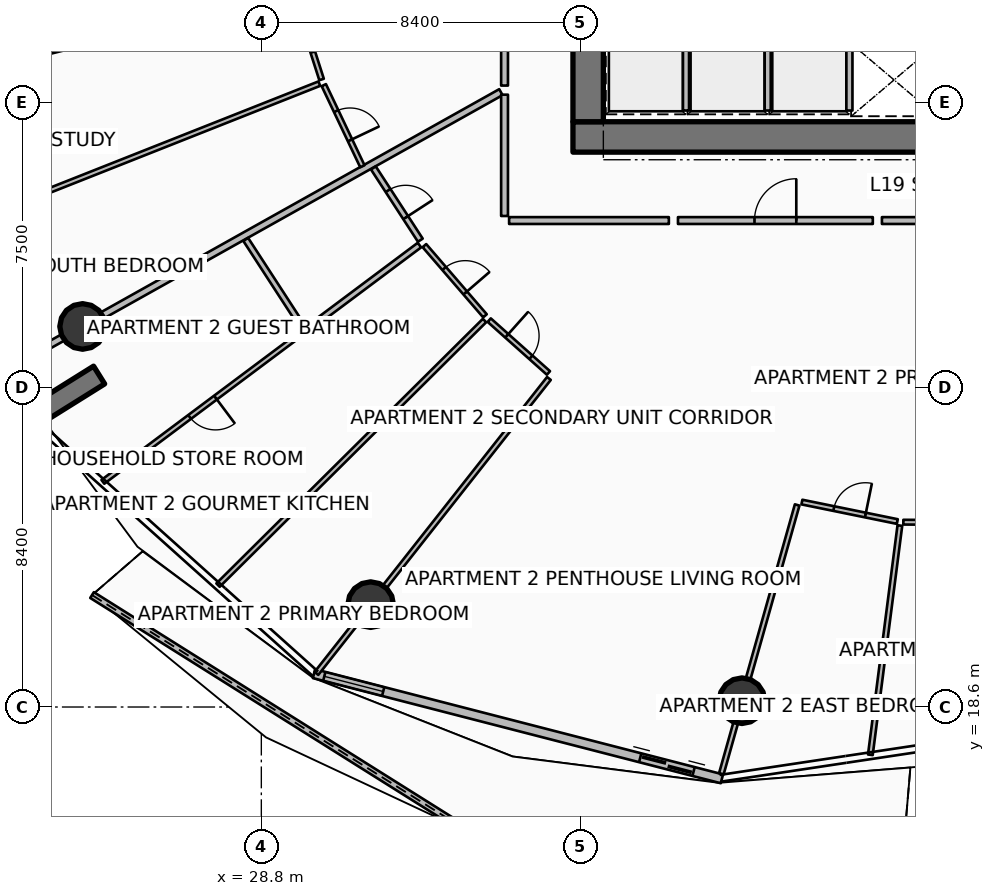
"""IFC4 building model, lengths in metres.
Left out: names, types, materials, properties, quantities, classifications, styles, units other than length and angle.
Written with IfcOpenShell. Run it as: python <this file> out.ifc"""

import sys

from ifc_helpers import new_model, si_unit, direction, frame, frame_2d, origin, origin_2d, place, context, subcontext, project, spatial, polyline, rectangle, circle, outline, extrude, element, fill, save


model = new_model("IFC4")
c1 = context("Model", 3, precision=1e-05, world=origin(), true_north=direction((0.0, 1.0)))
c2 = subcontext(c1, "Body", "Model", "MODEL_VIEW")
j1 = project(units=[si_unit("LENGTHUNIT", "METRE"), si_unit("PLANEANGLEUNIT", "RADIAN")], contexts=[c1])
p1 = place(None, origin())
s1 = spatial("IfcSite", under=j1, at=p1, CompositionType="ELEMENT")
p2 = place(p1, origin())
s2 = spatial("IfcBuilding", under=s1, at=p2, CompositionType="ELEMENT")
p3 = place(p2, frame((0.0, 0.0, 78.9)))
s3 = spatial("IfcBuildingStorey", under=s2, at=p3, CompositionType="ELEMENT", Elevation=78.9)
p4 = place(p3, frame((37.0, 33.6, 0.0), z_axis=(0.0, 0.0, 1.0), x_axis=(1.0, 0.0, 0.0)))
e1 = element("IfcWall", 1, at=p4, inside=s3, PredefinedType="SHEAR", context=c2, shape_type="SweptSolid", body=[
    extrude(rectangle(XDim=9.9, YDim=0.8, at=frame_2d((4.95, 0.0))), origin(), (0.0, 0.0, 1.0), 3.75),
])
p5 = place(p3, frame((37.4, 34.0, 0.0), z_axis=(0.0, 0.0, 1.0), x_axis=(0.0, 1.0, 0.0)))
e2 = element("IfcWall", 2, at=p5, inside=s3, PredefinedType="SHEAR", context=c2, shape_type="SweptSolid", body=[
    extrude(rectangle(XDim=16.0, YDim=0.8, at=frame_2d((8.0, 0.0))), origin(), (0.0, 0.0, 1.0), 3.75),
])
p6 = place(p3, frame((24.531, 27.335, 0.0), z_axis=(0.0, 0.0, 1.0), x_axis=(-0.848053161125, -0.529911158502, 0.0)))
e3 = element("IfcWall", 3, at=p6, inside=s3, PredefinedType="SOLIDWALL", context=c2, shape_type="SweptSolid", body=[
    extrude(rectangle(XDim=3.5, YDim=0.55, at=frame_2d((1.75, 0.0))), origin(), (0.0, 0.0, 1.0), 3.75),
])
for number, where, z_axis, x_axis in (
    (4, (24.097, 28.614, 0.0), (0.0, 0.0, 1.0), (1.0, 0.0, 0.0)),
    (5, (31.677, 21.294, 0.0), (0.0, 0.0, 1.0), (1.0, 0.0, 0.0)),
    (6, (41.447, 18.766, 0.0), (0.0, 0.0, 1.0), (1.0, 0.0, 0.0)),
):
    element("IfcColumn", number, at=place(p3, frame(where, z_axis=z_axis, x_axis=x_axis)), inside=s3, PredefinedType="COLUMN", context=c2, shape_type="SweptSolid", body=[
        extrude(circle(Radius=0.6, at=origin_2d()), origin(), (0.0, 0.0, 1.0), 3.5),
    ])
p7 = place(p3, frame((24.345, 21.546, 0.0), z_axis=(0.0, 0.0, 1.0), x_axis=(0.846860965628, -0.531814351908, 0.0)))
e7 = element("IfcWall", 7, at=p7, inside=s3, PredefinedType="PARAPET", context=c2, shape_type="SweptSolid", body=[
    extrude(outline(polyline([(0.0, 0.0), (11.718, 0.0), (11.718, 1.632), (5.859, 1.418), (0.0, 1.233), (0.0, 0.0)])), frame((0.0, 0.09, 0.0), z_axis=(0.0, -1.0, 0.0), x_axis=(1.0, 0.0, 0.0)), (0.0, 0.0, 1.0), 0.18),
])
p8 = place(p3, frame((46.0, 14.436, 0.0), z_axis=(0.0, 0.0, 1.0), x_axis=(0.962322473133, 0.271910753195, 0.0)))
e8 = element("IfcWall", 8, at=p8, inside=s3, PredefinedType="PARAPET", context=c2, shape_type="SweptSolid", body=[
    extrude(outline(polyline([(0.0, 0.0), (10.308, 0.0), (10.308, 1.632), (5.154, 1.798), (0.0, 1.86), (0.0, 0.0)])), frame((0.0, 0.09, 0.0), z_axis=(0.0, -1.0, 0.0), x_axis=(1.0, 0.0, 0.0)), (0.0, 0.0, 1.0), 0.18),
])
p9 = place(p3, frame((30.186, 19.477, 0.0), z_axis=(0.0, 0.0, 1.0), x_axis=(0.968356180858, -0.249572248045, 0.0)))
e9 = element("IfcWall", 9, at=p9, inside=s3, PredefinedType="SOLIDWALL", context=c2, shape_type="SweptSolid", body=[
    extrude(rectangle(XDim=11.084, YDim=0.24, at=frame_2d((5.542, 0.0))), origin(), (0.0, 0.0, 1.0), 2.45),
])
p10 = place(p9, frame((8.865, 0.0, 0.0)))
e10 = element("IfcOpeningElement", 10, at=p10, cuts=e9, PredefinedType="OPENING", context=c2, shape_type="SweptSolid", body=[
    extrude(rectangle(XDim=1.45, YDim=2.15, at=frame_2d((0.725, 1.075))), frame((0.0, 0.13, 0.0), z_axis=(0.0, -1.0, 0.0), x_axis=(1.0, 0.0, 0.0)), (0.0, 0.0, 1.0), 0.26),
])
p11 = place(p9, frame((0.28, 0.0, 0.65)))
e11 = element("IfcOpeningElement", 11, at=p11, cuts=e9, PredefinedType="OPENING", context=c2, shape_type="SweptSolid", body=[
    extrude(rectangle(XDim=1.6, YDim=1.5, at=frame_2d((0.8, 0.75))), frame((0.0, 0.13, 0.0), z_axis=(0.0, -1.0, 0.0), x_axis=(1.0, 0.0, 0.0)), (0.0, 0.0, 1.0), 0.26),
])
for number, where, z_axis, x_axis in (
    (12, (39.975, 34.295, 0.0), (0.0, 0.0, 1.0), (0.0, 1.0, 0.0)),
    (13, (42.125, 34.295, 0.0), (0.0, 0.0, 1.0), (0.0, 1.0, 0.0)),
    (14, (44.275, 34.295, 0.0), (0.0, 0.0, 1.0), (0.0, 1.0, 0.0)),
):
    element("IfcWall", number, at=place(p3, frame(where, z_axis=z_axis, x_axis=x_axis)), inside=s3, PredefinedType="PARTITIONING", context=c2, shape_type="SweptSolid", body=[
        extrude(rectangle(XDim=1.61, YDim=0.16, at=frame_2d((0.805, 0.0))), origin(), (0.0, 0.0, 1.0), 3.5),
    ])
p12 = place(p3, frame((35.104, 34.778, 0.0), z_axis=(0.0, 0.0, 1.0), x_axis=(-0.872490437896, -0.488631185845, 0.0)))
e15 = element("IfcWall", 15, at=p12, inside=s3, PredefinedType="PARTITIONING", context=c2, shape_type="SweptSolid", body=[
    extrude(rectangle(XDim=14.699, YDim=0.18, at=frame_2d((7.35, 0.0))), origin(), (0.0, 0.0, 1.0), 2.94),
])
p13 = place(p3, frame((35.2, 40.365, 0.0), z_axis=(0.0, 0.0, 1.0), x_axis=(0.0, -1.0, 0.0)))
e16 = element("IfcWall", 16, at=p13, inside=s3, PredefinedType="PARTITIONING", context=c2, shape_type="SweptSolid", body=[
    extrude(rectangle(XDim=5.413, YDim=0.18, at=frame_2d((2.707, 0.0))), origin(), (0.0, 0.0, 1.0), 2.94),
])
p14 = place(p3, frame((29.552, 37.417, 0.0), z_axis=(0.0, 0.0, 1.0), x_axis=(-0.970504192203, -0.241084244437, 0.0)))
e17 = element("IfcWall", 17, at=p14, inside=s3, PredefinedType="PARTITIONING", context=c2, shape_type="SweptSolid", body=[
    extrude(rectangle(XDim=9.976, YDim=0.125, at=frame_2d((4.988, 0.0))), origin(), (0.0, 0.0, 1.0), 2.94),
])
p15 = place(p3, frame((30.326, 35.002, 0.0), z_axis=(0.0, 0.0, 1.0), x_axis=(-0.929777602375, -0.368121732748, 0.0)))
e18 = element("IfcWall", 18, at=p15, inside=s3, PredefinedType="PARTITIONING", context=c2, shape_type="SweptSolid", body=[
    extrude(rectangle(XDim=9.961, YDim=0.125, at=frame_2d((4.98, 0.0))), origin(), (0.0, 0.0, 1.0), 2.94),
])
p16 = place(p3, frame((29.663, 37.363, 0.0), z_axis=(0.0, 0.0, 1.0), x_axis=(0.305393983716, -0.952226083822, 0.0)))
e19 = element("IfcWall", 19, at=p16, inside=s3, PredefinedType="PARTITIONING", context=c2, shape_type="SweptSolid", body=[
    extrude(rectangle(XDim=2.364, YDim=0.125, at=frame_2d((1.182, 0.0))), origin(), (0.0, 0.0, 1.0), 2.94),
])
p17 = place(p16, frame((0.757, 0.0, 0.0)))
e20 = element("IfcOpeningElement", 20, at=p17, cuts=e19, PredefinedType="OPENING", context=c2, shape_type="SweptSolid", body=[
    extrude(rectangle(XDim=0.85, YDim=2.06, at=frame_2d((0.425, 1.03))), frame((0.0, 0.073, 0.0), z_axis=(0.0, -1.0, 0.0), x_axis=(1.0, 0.0, 0.0)), (0.0, 0.0, 1.0), 0.145),
])
p18 = place(p3, frame((30.444, 34.963, 0.0), z_axis=(0.0, 0.0, 1.0), x_axis=(0.429404357622, -0.903112339443, 0.0)))
e21 = element("IfcWall", 21, at=p18, inside=s3, PredefinedType="PARTITIONING", context=c2, shape_type="SweptSolid", body=[
    extrude(rectangle(XDim=2.364, YDim=0.125, at=frame_2d((1.182, 0.0))), origin(), (0.0, 0.0, 1.0), 2.94),
])
p19 = place(p18, frame((0.757, 0.0, 0.0)))
e22 = element("IfcOpeningElement", 22, at=p19, cuts=e21, PredefinedType="OPENING", context=c2, shape_type="SweptSolid", body=[
    extrude(rectangle(XDim=0.85, YDim=2.06, at=frame_2d((0.425, 1.03))), frame((0.0, 0.073, 0.0), z_axis=(0.0, -1.0, 0.0), x_axis=(1.0, 0.0, 0.0)), (0.0, 0.0, 1.0), 0.145),
])
p20 = place(p3, frame((39.764, 31.4, 0.0), z_axis=(0.0, 0.0, 1.0), x_axis=(1.0, 0.0, 0.0)))
e23 = element("IfcWall", 23, at=p20, inside=s3, PredefinedType="PARTITIONING", context=c2, shape_type="SweptSolid", body=[
    extrude(rectangle(XDim=5.127, YDim=0.18, at=frame_2d((2.563, 0.0))), origin(), (0.0, 0.0, 1.0), 2.94),
])
p21 = place(p20, frame((2.013, 0.0, 0.0)))
e24 = element("IfcOpeningElement", 24, at=p21, cuts=e23, PredefinedType="OPENING", context=c2, shape_type="SweptSolid", body=[
    extrude(rectangle(XDim=1.1, YDim=2.1, at=frame_2d((0.55, 1.05))), frame((0.0, 0.1, 0.0), z_axis=(0.0, -1.0, 0.0), x_axis=(1.0, 0.0, 0.0)), (0.0, 0.0, 1.0), 0.2),
])
p22 = place(p3, frame((35.2, 34.712, 0.0), z_axis=(0.0, 0.0, 1.0), x_axis=(0.0, -1.0, 0.0)))
e25 = element("IfcWall", 25, at=p22, inside=s3, PredefinedType="PARTITIONING", context=c2, shape_type="SweptSolid", body=[
    extrude(rectangle(XDim=3.192, YDim=0.18, at=frame_2d((1.596, 0.0))), origin(), (0.0, 0.0, 1.0), 2.94),
])
p23 = place(p3, frame((35.32, 31.4, 0.0), z_axis=(0.0, 0.0, 1.0), x_axis=(1.0, 0.0, 0.0)))
e26 = element("IfcWall", 26, at=p23, inside=s3, PredefinedType="PARTITIONING", context=c2, shape_type="SweptSolid", body=[
    extrude(rectangle(XDim=4.204, YDim=0.18, at=frame_2d((2.102, 0.0))), origin(), (0.0, 0.0, 1.0), 2.94),
])
p24 = place(p3, frame((36.368, 27.245, 0.0), z_axis=(0.0, 0.0, 1.0), x_axis=(-0.619096231027, -0.785315132115, 0.0)))
e27 = element("IfcWall", 27, at=p24, inside=s3, PredefinedType="PARTITIONING", context=c2, shape_type="SweptSolid", body=[
    extrude(rectangle(XDim=9.882, YDim=0.125, at=frame_2d((4.941, 0.0))), origin(), (0.0, 0.0, 1.0), 2.94),
])
p25 = place(p3, frame((31.748, 32.784, 0.0), z_axis=(0.0, 0.0, 1.0), x_axis=(0.544920213423, -0.838487901524, 0.0)))
e28 = element("IfcWall", 28, at=p25, inside=s3, PredefinedType="PARTITIONING", context=c2, shape_type="SweptSolid", body=[
    extrude(rectangle(XDim=2.267, YDim=0.15, at=frame_2d((1.134, 0.0))), origin(), (0.0, 0.0, 1.0), 2.94),
])
p26 = place(p25, frame((0.708, 0.0, 0.0)))
e29 = element("IfcOpeningElement", 29, at=p26, cuts=e28, PredefinedType="OPENING", context=c2, shape_type="SweptSolid", body=[
    extrude(rectangle(XDim=0.85, YDim=2.06, at=frame_2d((0.425, 1.03))), frame((0.0, 0.085, 0.0), z_axis=(0.0, -1.0, 0.0), x_axis=(1.0, 0.0, 0.0)), (0.0, 0.0, 1.0), 0.17),
])
p27 = place(p3, frame((28.389, 30.903, 0.0), z_axis=(0.0, 0.0, 1.0), x_axis=(0.544849096032, -0.838534115318, 0.0)))
e30 = element("IfcWall", 30, at=p27, inside=s3, PredefinedType="PARTITIONING", context=c2, shape_type="SweptSolid", body=[
    extrude(rectangle(XDim=2.773, YDim=0.15, at=frame_2d((1.387, 0.0))), origin(), (0.0, 0.0, 1.0), 2.94),
])
p28 = place(p3, frame((32.961, 30.754, 0.0), z_axis=(0.0, 0.0, 1.0), x_axis=(-0.800889069655, -0.598812740435, 0.0)))
e31 = element("IfcWall", 31, at=p28, inside=s3, PredefinedType="PARTITIONING", context=c2, shape_type="SweptSolid", body=[
    extrude(rectangle(XDim=3.72, YDim=0.15, at=frame_2d((1.86, 0.0))), origin(), (0.0, 0.0, 1.0), 2.94),
])
p29 = place(p3, frame((29.877, 28.448, 0.0), z_axis=(0.0, 0.0, 1.0), x_axis=(-0.800862229892, -0.598848635911, 0.0)))
e32 = element("IfcWall", 32, at=p29, inside=s3, PredefinedType="PARTITIONING", context=c2, shape_type="SweptSolid", body=[
    extrude(rectangle(XDim=6.552, YDim=0.125, at=frame_2d((3.276, 0.0))), origin(), (0.0, 0.0, 1.0), 2.94),
])
p30 = place(p29, frame((2.851, 0.0, 0.0)))
e33 = element("IfcOpeningElement", 33, at=p30, cuts=e32, PredefinedType="OPENING", context=c2, shape_type="SweptSolid", body=[
    extrude(rectangle(XDim=0.85, YDim=2.06, at=frame_2d((0.425, 1.03))), frame((0.0, 0.073, 0.0), z_axis=(0.0, -1.0, 0.0), x_axis=(1.0, 0.0, 0.0)), (0.0, 0.0, 1.0), 0.145),
])
p31 = place(p3, frame((34.673, 28.769, 0.0), z_axis=(0.0, 0.0, 1.0), x_axis=(-0.709671596246, -0.70453262911, 0.0)))
e34 = element("IfcWall", 34, at=p31, inside=s3, PredefinedType="PARTITIONING", context=c2, shape_type="SweptSolid", body=[
    extrude(rectangle(XDim=9.882, YDim=0.125, at=frame_2d((4.941, 0.0))), origin(), (0.0, 0.0, 1.0), 2.94),
])
p32 = place(p3, frame((33.092, 30.74, 0.0), z_axis=(0.0, 0.0, 1.0), x_axis=(0.653244508484, -0.757147021479, 0.0)))
e35 = element("IfcWall", 35, at=p32, inside=s3, PredefinedType="PARTITIONING", context=c2, shape_type="SweptSolid", body=[
    extrude(rectangle(XDim=2.439, YDim=0.125, at=frame_2d((1.219, 0.0))), origin(), (0.0, 0.0, 1.0), 2.94),
])
p33 = place(p32, frame((0.794, 0.0, 0.0)))
e36 = element("IfcOpeningElement", 36, at=p33, cuts=e35, PredefinedType="OPENING", context=c2, shape_type="SweptSolid", body=[
    extrude(rectangle(XDim=0.85, YDim=2.06, at=frame_2d((0.425, 1.03))), frame((0.0, 0.073, 0.0), z_axis=(0.0, -1.0, 0.0), x_axis=(1.0, 0.0, 0.0)), (0.0, 0.0, 1.0), 0.145),
])
p34 = place(p3, frame((34.797, 28.78, 0.0), z_axis=(0.0, 0.0, 1.0), x_axis=(0.74635037564, -0.665553241132, 0.0)))
e37 = element("IfcWall", 37, at=p34, inside=s3, PredefinedType="PARTITIONING", context=c2, shape_type="SweptSolid", body=[
    extrude(rectangle(XDim=2.088, YDim=0.125, at=frame_2d((1.044, 0.0))), origin(), (0.0, 0.0, 1.0), 2.94),
])
p35 = place(p34, frame((0.619, 0.0, 0.0)))
e38 = element("IfcOpeningElement", 38, at=p35, cuts=e37, PredefinedType="OPENING", context=c2, shape_type="SweptSolid", body=[
    extrude(rectangle(XDim=0.85, YDim=2.06, at=frame_2d((0.425, 1.03))), frame((0.0, 0.073, 0.0), z_axis=(0.0, -1.0, 0.0), x_axis=(1.0, 0.0, 0.0)), (0.0, 0.0, 1.0), 0.145),
])
p36 = place(p3, frame((45.131, 31.4, 0.0), z_axis=(0.0, 0.0, 1.0), x_axis=(1.0, 0.0, 0.0)))
e39 = element("IfcWall", 39, at=p36, inside=s3, PredefinedType="PARTITIONING", context=c2, shape_type="SweptSolid", body=[
    extrude(rectangle(XDim=4.004, YDim=0.18, at=frame_2d((2.002, 0.0))), origin(), (0.0, 0.0, 1.0), 2.94),
])
p37 = place(p3, frame((42.9, 23.917, 0.0), z_axis=(0.0, 0.0, 1.0), x_axis=(-0.27145069635, -0.962452346587, 0.0)))
e40 = element("IfcWall", 40, at=p37, inside=s3, PredefinedType="PARTITIONING", context=c2, shape_type="SweptSolid", body=[
    extrude(rectangle(XDim=7.349, YDim=0.125, at=frame_2d((3.674, 0.0))), origin(), (0.0, 0.0, 1.0), 2.94),
])
p38 = place(p3, frame((45.603, 23.375, 0.0), z_axis=(0.0, 0.0, 1.0), x_axis=(-0.127689849516, -0.991814147071, 0.0)))
e41 = element("IfcWall", 41, at=p38, inside=s3, PredefinedType="PARTITIONING", context=c2, shape_type="SweptSolid", body=[
    extrude(rectangle(XDim=6.082, YDim=0.125, at=frame_2d((3.041, 0.0))), origin(), (0.0, 0.0, 1.0), 2.94),
])
p39 = place(p3, frame((43.025, 23.993, 0.0), z_axis=(0.0, 0.0, 1.0), x_axis=(0.97978119615, -0.200072006215, 0.0)))
e42 = element("IfcWall", 42, at=p39, inside=s3, PredefinedType="PARTITIONING", context=c2, shape_type="SweptSolid", body=[
    extrude(rectangle(XDim=2.562, YDim=0.125, at=frame_2d((1.281, 0.0))), origin(), (0.0, 0.0, 1.0), 2.94),
])
p40 = place(p39, frame((0.856, 0.0, 0.0)))
e43 = element("IfcOpeningElement", 43, at=p40, cuts=e42, PredefinedType="OPENING", context=c2, shape_type="SweptSolid", body=[
    extrude(rectangle(XDim=0.85, YDim=2.06, at=frame_2d((0.425, 1.03))), frame((0.0, 0.073, 0.0), z_axis=(0.0, -1.0, 0.0), x_axis=(1.0, 0.0, 0.0)), (0.0, 0.0, 1.0), 0.145),
])
p41 = place(p3, frame((45.694, 23.463, 0.0), z_axis=(0.0, 0.0, 1.0), x_axis=(0.999986986287, -0.005101691496, 0.0)))
e44 = element("IfcWall", 44, at=p41, inside=s3, PredefinedType="PARTITIONING", context=c2, shape_type="SweptSolid", body=[
    extrude(rectangle(XDim=4.403, YDim=0.125, at=frame_2d((2.201, 0.0))), origin(), (0.0, 0.0, 1.0), 2.94),
])
p42 = place(p41, frame((1.751, 0.0, 0.0)))
e45 = element("IfcOpeningElement", 45, at=p42, cuts=e44, PredefinedType="OPENING", context=c2, shape_type="SweptSolid", body=[
    extrude(rectangle(XDim=0.9, YDim=2.08, at=frame_2d((0.45, 1.04))), frame((0.0, 0.073, 0.0), z_axis=(0.0, -1.0, 0.0), x_axis=(1.0, 0.0, 0.0)), (0.0, 0.0, 1.0), 0.145),
])
p43 = place(p10, origin())
e46 = element("IfcDoor", 46, at=p43, inside=s3, OperationType="DOUBLE_DOOR_SLIDING", PredefinedType="DOOR", context=c2, shape_type="SweptSolid", body=[
    extrude(rectangle(XDim=1.45, YDim=2.15, at=frame_2d((0.725, 1.075))), frame((0.0, 0.025, 0.0), z_axis=(0.0, -1.0, 0.0), x_axis=(1.0, 0.0, 0.0)), (0.0, 0.0, 1.0), 0.05),
])
fill(e10, e46)
p44 = place(p11, origin())
e47 = element("IfcWindow", 47, at=p44, inside=s3, PartitioningType="SINGLE_PANEL", PredefinedType="WINDOW", context=c2, shape_type="SweptSolid", body=[
    extrude(rectangle(XDim=1.6, YDim=1.5, at=frame_2d((0.8, 0.75))), frame((0.0, 0.03, 0.0), z_axis=(0.0, -1.0, 0.0), x_axis=(1.0, 0.0, 0.0)), (0.0, 0.0, 1.0), 0.06),
])
fill(e11, e47)
p45 = place(p17, origin())
e48 = element("IfcDoor", 48, at=p45, inside=s3, OperationType="SINGLE_SWING_LEFT", PredefinedType="DOOR", context=c2, shape_type="SweptSolid", body=[
    extrude(rectangle(XDim=0.85, YDim=2.06, at=frame_2d((0.425, 1.03))), frame((0.0, 0.025, 0.0), z_axis=(0.0, -1.0, 0.0), x_axis=(1.0, 0.0, 0.0)), (0.0, 0.0, 1.0), 0.05),
])
fill(e20, e48)
p46 = place(p19, origin())
e49 = element("IfcDoor", 49, at=p46, inside=s3, OperationType="SINGLE_SWING_RIGHT", PredefinedType="DOOR", context=c2, shape_type="SweptSolid", body=[
    extrude(rectangle(XDim=0.85, YDim=2.06, at=frame_2d((0.425, 1.03))), frame((0.0, 0.025, 0.0), z_axis=(0.0, -1.0, 0.0), x_axis=(1.0, 0.0, 0.0)), (0.0, 0.0, 1.0), 0.05),
])
fill(e22, e49)
p47 = place(p21, origin())
e50 = element("IfcDoor", 50, at=p47, inside=s3, OperationType="SINGLE_SWING_RIGHT", PredefinedType="DOOR", context=c2, shape_type="SweptSolid", body=[
    extrude(rectangle(XDim=1.1, YDim=2.1, at=frame_2d((0.55, 1.05))), frame((0.0, 0.025, 0.0), z_axis=(0.0, -1.0, 0.0), x_axis=(1.0, 0.0, 0.0)), (0.0, 0.0, 1.0), 0.05),
])
fill(e24, e50)
p48 = place(p26, origin())
e51 = element("IfcDoor", 51, at=p48, inside=s3, OperationType="SINGLE_SWING_RIGHT", PredefinedType="DOOR", context=c2, shape_type="SweptSolid", body=[
    extrude(rectangle(XDim=0.85, YDim=2.06, at=frame_2d((0.425, 1.03))), frame((0.0, 0.025, 0.0), z_axis=(0.0, -1.0, 0.0), x_axis=(1.0, 0.0, 0.0)), (0.0, 0.0, 1.0), 0.05),
])
fill(e29, e51)
p49 = place(p30, origin())
e52 = element("IfcDoor", 52, at=p49, inside=s3, OperationType="SINGLE_SWING_LEFT", PredefinedType="DOOR", context=c2, shape_type="SweptSolid", body=[
    extrude(rectangle(XDim=0.85, YDim=2.06, at=frame_2d((0.425, 1.03))), frame((0.0, 0.025, 0.0), z_axis=(0.0, -1.0, 0.0), x_axis=(1.0, 0.0, 0.0)), (0.0, 0.0, 1.0), 0.05),
])
fill(e33, e52)
p50 = place(p33, origin())
e53 = element("IfcDoor", 53, at=p50, inside=s3, OperationType="SINGLE_SWING_RIGHT", PredefinedType="DOOR", context=c2, shape_type="SweptSolid", body=[
    extrude(rectangle(XDim=0.85, YDim=2.06, at=frame_2d((0.425, 1.03))), frame((0.0, 0.025, 0.0), z_axis=(0.0, -1.0, 0.0), x_axis=(1.0, 0.0, 0.0)), (0.0, 0.0, 1.0), 0.05),
])
fill(e36, e53)
p51 = place(p35, origin())
e54 = element("IfcDoor", 54, at=p51, inside=s3, OperationType="SINGLE_SWING_LEFT", PredefinedType="DOOR", context=c2, shape_type="SweptSolid", body=[
    extrude(rectangle(XDim=0.85, YDim=2.06, at=frame_2d((0.425, 1.03))), frame((0.0, 0.025, 0.0), z_axis=(0.0, -1.0, 0.0), x_axis=(1.0, 0.0, 0.0)), (0.0, 0.0, 1.0), 0.05),
])
fill(e38, e54)
p52 = place(p40, origin())
e55 = element("IfcDoor", 55, at=p52, inside=s3, OperationType="SINGLE_SWING_RIGHT", PredefinedType="DOOR", context=c2, shape_type="SweptSolid", body=[
    extrude(rectangle(XDim=0.85, YDim=2.06, at=frame_2d((0.425, 1.03))), frame((0.0, 0.025, 0.0), z_axis=(0.0, -1.0, 0.0), x_axis=(1.0, 0.0, 0.0)), (0.0, 0.0, 1.0), 0.05),
])
fill(e43, e55)
save(model, sys.argv[1])
